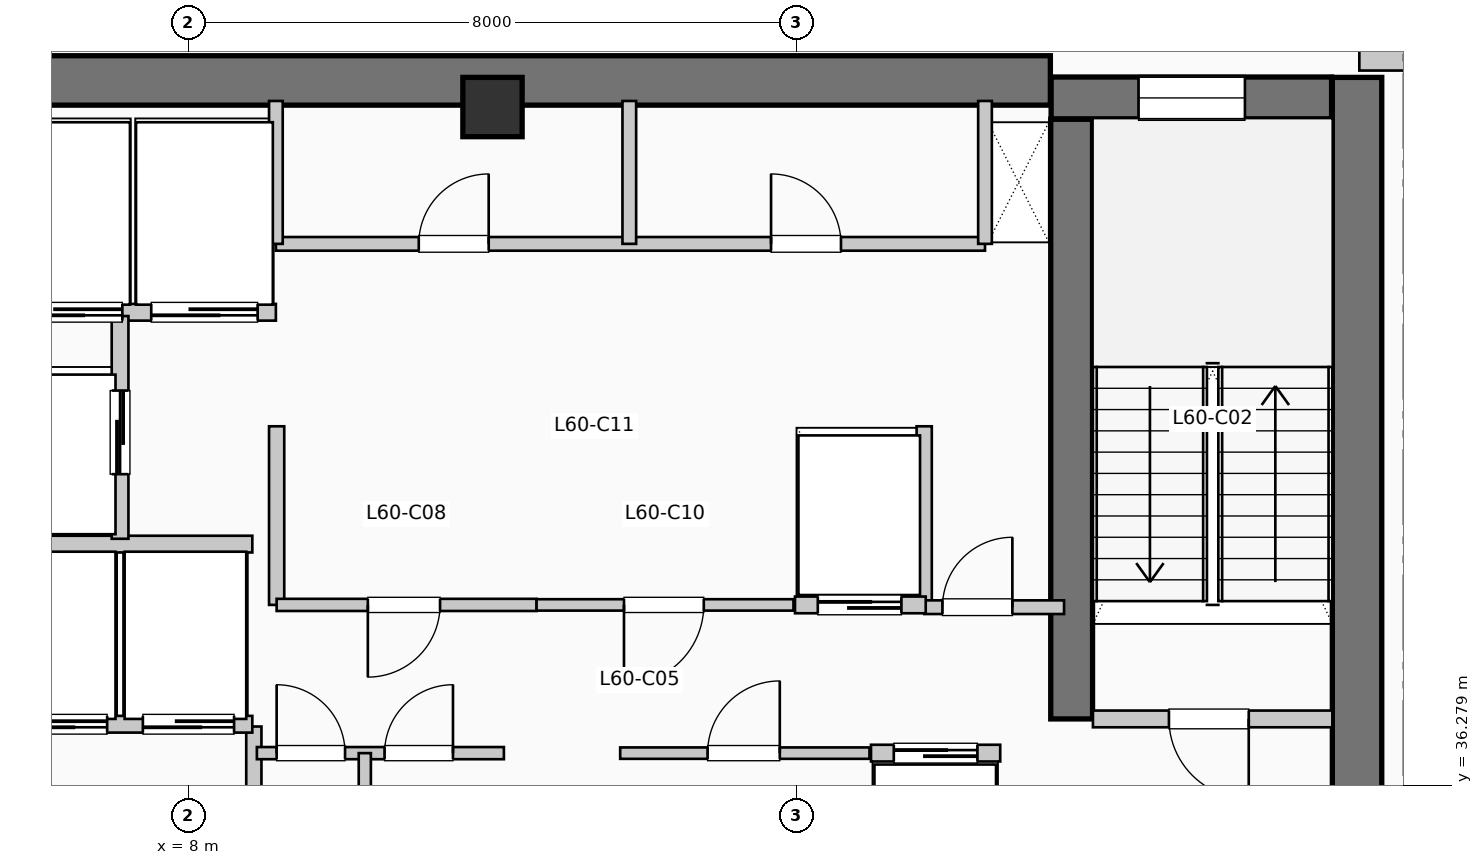
"""IFC4 building model, lengths in metres.
Left out: names, types, materials, properties, quantities, classifications, styles, units other than length and angle.
Written with IfcOpenShell. Run it as: python <this file> out.ifc"""

import sys

from ifc_helpers import new_model, si_unit, direction, frame, frame_2d, origin, origin_2d, place, context, subcontext, project, spatial, rectangle, extrude, element, fill, save


model = new_model("IFC4")
c1 = context("Model", 3, precision=1e-05, world=origin(), true_north=direction((0.0, 1.0)))
c2 = subcontext(c1, "Body", "Model", "MODEL_VIEW")
j1 = project(units=[si_unit("LENGTHUNIT", "METRE"), si_unit("PLANEANGLEUNIT", "RADIAN")], contexts=[c1])
p1 = place(None, origin())
s1 = spatial("IfcSite", under=j1, at=p1, CompositionType="ELEMENT")
p2 = place(p1, origin())
s2 = spatial("IfcBuilding", under=s1, at=p2, CompositionType="ELEMENT")
p3 = place(p2, frame((0.0, 0.0, 247.5)))
s3 = spatial("IfcBuildingStorey", under=s2, at=p3, CompositionType="ELEMENT", Elevation=247.5)
p4 = place(p3, frame((5.36, 45.55, 0.0), z_axis=(0.0, 0.0, 1.0), x_axis=(1.0, 0.0, 0.0)))
e1 = element("IfcWall", 1, at=p4, inside=s3, PredefinedType="SHEAR", context=c2, shape_type="SweptSolid", body=[
    extrude(rectangle(XDim=13.98, YDim=0.65, at=frame_2d((6.99, 0.0))), origin(), (0.0, 0.0, 1.0), 3.96),
])
p5 = place(p3, frame((23.375, 34.95, 0.0), z_axis=(0.0, 0.0, 1.0), x_axis=(0.0, 1.0, 0.0)))
e2 = element("IfcWall", 2, at=p5, inside=s3, PredefinedType="SHEAR", context=c2, shape_type="SweptSolid", body=[
    extrude(rectangle(XDim=10.64, YDim=0.65, at=frame_2d((5.32, 0.0))), origin(), (0.0, 0.0, 1.0), 3.96),
])
p6 = place(p3, frame((19.62, 37.15, 0.0), z_axis=(0.0, 0.0, 1.0), x_axis=(0.0, 1.0, 0.0)))
e3 = element("IfcWall", 3, at=p6, inside=s3, PredefinedType="SHEAR", context=c2, shape_type="SweptSolid", body=[
    extrude(rectangle(XDim=7.89, YDim=0.55, at=frame_2d((3.945, 0.0))), origin(), (0.0, 0.0, 1.0), 3.96),
])
p7 = place(p3, frame((19.35, 45.32, 0.0), z_axis=(0.0, 0.0, 1.0), x_axis=(1.0, 0.0, 0.0)))
e4 = element("IfcWall", 4, at=p7, inside=s3, PredefinedType="SHEAR", context=c2, shape_type="SweptSolid", body=[
    extrude(rectangle(XDim=3.69, YDim=0.55, at=frame_2d((1.845, 0.0))), origin(), (0.0, 0.0, 1.0), 3.96),
])
p8 = place(p7, frame((1.15, 0.0, 1.05)))
e5 = element("IfcOpeningElement", 5, at=p8, cuts=e4, PredefinedType="OPENING", context=c2, shape_type="SweptSolid", body=[
    extrude(rectangle(XDim=1.4, YDim=1.8, at=frame_2d((0.7, 0.9))), frame((0.0, 0.285, 0.0), z_axis=(0.0, -1.0, 0.0), x_axis=(1.0, 0.0, 0.0)), (0.0, 0.0, 1.0), 0.57),
])
p9 = place(p3, frame((12.0, 45.2, 0.0), z_axis=(0.0, 0.0, 1.0), x_axis=(1.0, 0.0, 0.0)))
e6 = element("IfcColumn", 6, at=p9, inside=s3, PredefinedType="COLUMN", context=c2, shape_type="SweptSolid", body=[
    extrude(rectangle(XDim=0.78, YDim=0.78, at=origin_2d()), origin(), (0.0, 0.0, 1.0), 3.96),
])
p10 = place(p3, frame((47.145, 45.84, 0.0), z_axis=(0.0, 0.0, 1.0), x_axis=(-1.0, 0.0, 0.0)))
e7 = element("IfcWall", 7, at=p10, inside=s3, PredefinedType="SOLIDWALL", context=c2, shape_type="SweptSolid", body=[
    extrude(rectangle(XDim=23.74, YDim=0.32, at=frame_2d((11.87, 0.0))), origin(), (0.0, 0.0, 1.0), 3.54),
])
p11 = place(p3, frame((8.86, 34.55, 0.0), z_axis=(0.0, 0.0, 1.0), x_axis=(0.0, 1.0, 0.0)))
e8 = element("IfcWall", 8, at=p11, inside=s3, PredefinedType="PARTITIONING", context=c2, shape_type="SweptSolid", body=[
    extrude(rectangle(XDim=2.5, YDim=0.2, at=frame_2d((1.25, 0.0))), origin(), (0.0, 0.0, 1.0), 3.54),
])
p12 = place(p3, frame((19.9, 37.15, 0.0), z_axis=(0.0, 0.0, 1.0), x_axis=(1.0, 0.0, 0.0)))
e9 = element("IfcWall", 9, at=p12, inside=s3, PredefinedType="PARTITIONING", context=c2, shape_type="SweptSolid", body=[
    extrude(rectangle(XDim=3.15, YDim=0.22, at=frame_2d((1.575, 0.0))), origin(), (0.0, 0.0, 1.0), 3.54),
])
p13 = place(p12, frame((2.05, 0.0, 0.0), z_axis=(0.0, 0.0, 1.0), x_axis=(-1.0, 0.0, 0.0)))
e10 = element("IfcOpeningElement", 10, at=p13, cuts=e9, PredefinedType="OPENING", context=c2, shape_type="SweptSolid", body=[
    extrude(rectangle(XDim=1.05, YDim=2.15, at=frame_2d((0.525, 1.075))), frame((0.0, 0.12, 0.0), z_axis=(0.0, -1.0, 0.0), x_axis=(1.0, 0.0, 0.0)), (0.0, 0.0, 1.0), 0.24),
])
p14 = place(p3, frame((5.38, 37.08, 0.0), z_axis=(0.0, 0.0, 1.0), x_axis=(1.0, 0.0, 0.0)))
e11 = element("IfcWall", 11, at=p14, inside=s3, PredefinedType="PARTITIONING", context=c2, shape_type="SweptSolid", body=[
    extrude(rectangle(XDim=3.46, YDim=0.22, at=frame_2d((1.73, 0.0))), origin(), (0.0, 0.0, 1.0), 3.54),
])
p15 = place(p14, frame((1.55, 0.0, 0.0), z_axis=(0.0, 0.0, 1.0), x_axis=(-1.0, 0.0, 0.0)))
e12 = element("IfcOpeningElement", 12, at=p15, cuts=e11, PredefinedType="OPENING", context=c2, shape_type="SweptSolid", body=[
    extrude(rectangle(XDim=1.2, YDim=2.2, at=frame_2d((0.6, 1.1))), frame((0.0, 0.12, 0.0), z_axis=(0.0, -1.0, 0.0), x_axis=(1.0, 0.0, 0.0)), (0.0, 0.0, 1.0), 0.24),
])
p16 = place(p14, frame((3.22, 0.0, 0.0), z_axis=(0.0, 0.0, 1.0), x_axis=(-1.0, 0.0, 0.0)))
e13 = element("IfcOpeningElement", 13, at=p16, cuts=e11, PredefinedType="OPENING", context=c2, shape_type="SweptSolid", body=[
    extrude(rectangle(XDim=1.2, YDim=2.2, at=frame_2d((0.6, 1.1))), frame((0.0, 0.12, 0.0), z_axis=(0.0, -1.0, 0.0), x_axis=(1.0, 0.0, 0.0)), (0.0, 0.0, 1.0), 0.24),
])
p17 = place(p3, frame((5.38, 39.45, 0.0), z_axis=(0.0, 0.0, 1.0), x_axis=(1.0, 0.0, 0.0)))
e14 = element("IfcWall", 14, at=p17, inside=s3, PredefinedType="PARTITIONING", context=c2, shape_type="SweptSolid", body=[
    extrude(rectangle(XDim=3.46, YDim=0.22, at=frame_2d((1.73, 0.0))), origin(), (0.0, 0.0, 1.0), 3.54),
])
p18 = place(p3, frame((5.38, 42.5, 0.0), z_axis=(0.0, 0.0, 1.0), x_axis=(1.0, 0.0, 0.0)))
e15 = element("IfcWall", 15, at=p18, inside=s3, PredefinedType="PARTITIONING", context=c2, shape_type="SweptSolid", body=[
    extrude(rectangle(XDim=3.77, YDim=0.22, at=frame_2d((1.885, 0.0))), origin(), (0.0, 0.0, 1.0), 3.54),
])
p19 = place(p18, frame((1.75, 0.0, 0.0), z_axis=(0.0, 0.0, 1.0), x_axis=(-1.0, 0.0, 0.0)))
e16 = element("IfcOpeningElement", 16, at=p19, cuts=e15, PredefinedType="OPENING", context=c2, shape_type="SweptSolid", body=[
    extrude(rectangle(XDim=1.4, YDim=2.2, at=frame_2d((0.7, 1.1))), frame((0.0, 0.12, 0.0), z_axis=(0.0, -1.0, 0.0), x_axis=(1.0, 0.0, 0.0)), (0.0, 0.0, 1.0), 0.24),
])
p20 = place(p18, frame((3.53, 0.0, 0.0), z_axis=(0.0, 0.0, 1.0), x_axis=(-1.0, 0.0, 0.0)))
e17 = element("IfcOpeningElement", 17, at=p20, cuts=e15, PredefinedType="OPENING", context=c2, shape_type="SweptSolid", body=[
    extrude(rectangle(XDim=1.4, YDim=2.2, at=frame_2d((0.7, 1.1))), frame((0.0, 0.12, 0.0), z_axis=(0.0, -1.0, 0.0), x_axis=(1.0, 0.0, 0.0)), (0.0, 0.0, 1.0), 0.24),
])
p21 = place(p3, frame((7.1, 39.52, 0.0), z_axis=(0.0, 0.0, 1.0), x_axis=(0.0, 1.0, 0.0)))
e18 = element("IfcWall", 18, at=p21, inside=s3, PredefinedType="PARTITIONING", context=c2, shape_type="SweptSolid", body=[
    extrude(rectangle(XDim=2.93, YDim=0.22, at=frame_2d((1.465, 0.0))), origin(), (0.0, 0.0, 1.0), 3.54),
])
p22 = place(p21, frame((0.85, 0.0, 0.0)))
e19 = element("IfcOpeningElement", 19, at=p22, cuts=e18, PredefinedType="OPENING", context=c2, shape_type="SweptSolid", body=[
    extrude(rectangle(XDim=1.1, YDim=2.2, at=frame_2d((0.55, 1.1))), frame((0.0, 0.12, 0.0), z_axis=(0.0, -1.0, 0.0), x_axis=(1.0, 0.0, 0.0)), (0.0, 0.0, 1.0), 0.24),
])
for number, where, z_axis, x_axis in (
    (20, (9.16, 38.65, 0.0), (0.0, 0.0, 1.0), (0.0, 1.0, 0.0)),
    (21, (17.68, 38.65, 0.0), (0.0, 0.0, 1.0), (0.0, 1.0, 0.0)),
):
    element("IfcWall", number, at=place(p3, frame(where, z_axis=z_axis, x_axis=x_axis)), inside=s3, PredefinedType="PARTITIONING", context=c2, shape_type="SweptSolid", body=[
        extrude(rectangle(XDim=2.35, YDim=0.2, at=frame_2d((1.175, 0.0))), origin(), (0.0, 0.0, 1.0), 3.54),
    ])
p23 = place(p3, frame((17.68, 38.62, 0.0), z_axis=(0.0, 0.0, 1.0), x_axis=(1.0, 0.0, 0.0)))
e22 = element("IfcWall", 22, at=p23, inside=s3, PredefinedType="PARTITIONING", context=c2, shape_type="SweptSolid", body=[
    extrude(rectangle(XDim=1.84, YDim=0.18, at=frame_2d((0.92, 0.0))), origin(), (0.0, 0.0, 1.0), 3.54),
])
p24 = place(p23, frame((0.24, 0.0, 0.0)))
e23 = element("IfcOpeningElement", 23, at=p24, cuts=e22, PredefinedType="OPENING", context=c2, shape_type="SweptSolid", body=[
    extrude(rectangle(XDim=0.92, YDim=2.1, at=frame_2d((0.46, 1.05))), frame((0.0, 0.1, 0.0), z_axis=(0.0, -1.0, 0.0), x_axis=(1.0, 0.0, 0.0)), (0.0, 0.0, 1.0), 0.2),
])
p25 = place(p3, frame((8.9, 36.7, 0.0), z_axis=(0.0, 0.0, 1.0), x_axis=(1.0, 0.0, 0.0)))
e24 = element("IfcWall", 24, at=p25, inside=s3, PredefinedType="PARTITIONING", context=c2, shape_type="SweptSolid", body=[
    extrude(rectangle(XDim=3.25, YDim=0.16, at=frame_2d((1.625, 0.0))), origin(), (0.0, 0.0, 1.0), 3.54),
])
p26 = place(p25, frame((0.26, 0.0, 0.0)))
e25 = element("IfcOpeningElement", 25, at=p26, cuts=e24, PredefinedType="OPENING", context=c2, shape_type="SweptSolid", body=[
    extrude(rectangle(XDim=0.9, YDim=2.15, at=frame_2d((0.45, 1.075))), frame((0.0, 0.09, 0.0), z_axis=(0.0, -1.0, 0.0), x_axis=(1.0, 0.0, 0.0)), (0.0, 0.0, 1.0), 0.18),
])
p27 = place(p25, frame((1.68, 0.0, 0.0)))
e26 = element("IfcOpeningElement", 26, at=p27, cuts=e24, PredefinedType="OPENING", context=c2, shape_type="SweptSolid", body=[
    extrude(rectangle(XDim=0.9, YDim=2.15, at=frame_2d((0.45, 1.075))), frame((0.0, 0.09, 0.0), z_axis=(0.0, -1.0, 0.0), x_axis=(1.0, 0.0, 0.0)), (0.0, 0.0, 1.0), 0.18),
])
p28 = place(p3, frame((10.32, 34.55, 0.0), z_axis=(0.0, 0.0, 1.0), x_axis=(0.0, 1.0, 0.0)))
e27 = element("IfcWall", 27, at=p28, inside=s3, PredefinedType="PARTITIONING", context=c2, shape_type="SweptSolid", body=[
    extrude(rectangle(XDim=2.15, YDim=0.16, at=frame_2d((1.075, 0.0))), origin(), (0.0, 0.0, 1.0), 3.54),
])
p29 = place(p3, frame((9.16, 38.65, 0.0), z_axis=(0.0, 0.0, 1.0), x_axis=(1.0, 0.0, 0.0)))
e28 = element("IfcWall", 28, at=p29, inside=s3, PredefinedType="PARTITIONING", context=c2, shape_type="SweptSolid", body=[
    extrude(rectangle(XDim=3.42, YDim=0.16, at=frame_2d((1.71, 0.0))), origin(), (0.0, 0.0, 1.0), 3.54),
])
p30 = place(p29, frame((2.15, 0.0, 0.0), z_axis=(0.0, 0.0, 1.0), x_axis=(-1.0, 0.0, 0.0)))
e29 = element("IfcOpeningElement", 29, at=p30, cuts=e28, PredefinedType="OPENING", context=c2, shape_type="SweptSolid", body=[
    extrude(rectangle(XDim=0.95, YDim=2.15, at=frame_2d((0.475, 1.075))), frame((0.0, 0.09, 0.0), z_axis=(0.0, -1.0, 0.0), x_axis=(1.0, 0.0, 0.0)), (0.0, 0.0, 1.0), 0.18),
])
p31 = place(p3, frame((13.68, 36.7, 0.0), z_axis=(0.0, 0.0, 1.0), x_axis=(1.0, 0.0, 0.0)))
e30 = element("IfcWall", 30, at=p31, inside=s3, PredefinedType="PARTITIONING", context=c2, shape_type="SweptSolid", body=[
    extrude(rectangle(XDim=3.28, YDim=0.15, at=frame_2d((1.64, 0.0))), origin(), (0.0, 0.0, 1.0), 3.54),
])
p32 = place(p31, frame((1.15, 0.0, 0.0)))
e31 = element("IfcOpeningElement", 31, at=p32, cuts=e30, PredefinedType="OPENING", context=c2, shape_type="SweptSolid", body=[
    extrude(rectangle(XDim=0.95, YDim=2.15, at=frame_2d((0.475, 1.075))), frame((0.0, 0.085, 0.0), z_axis=(0.0, -1.0, 0.0), x_axis=(1.0, 0.0, 0.0)), (0.0, 0.0, 1.0), 0.17),
])
p33 = place(p3, frame((12.58, 38.65, 0.0), z_axis=(0.0, 0.0, 1.0), x_axis=(1.0, 0.0, 0.0)))
e32 = element("IfcWall", 32, at=p33, inside=s3, PredefinedType="PARTITIONING", context=c2, shape_type="SweptSolid", body=[
    extrude(rectangle(XDim=3.38, YDim=0.15, at=frame_2d((1.69, 0.0))), origin(), (0.0, 0.0, 1.0), 3.54),
])
p34 = place(p33, frame((2.2, 0.0, 0.0), z_axis=(0.0, 0.0, 1.0), x_axis=(-1.0, 0.0, 0.0)))
e33 = element("IfcOpeningElement", 33, at=p34, cuts=e32, PredefinedType="OPENING", context=c2, shape_type="SweptSolid", body=[
    extrude(rectangle(XDim=1.05, YDim=2.15, at=frame_2d((0.525, 1.075))), frame((0.0, 0.085, 0.0), z_axis=(0.0, -1.0, 0.0), x_axis=(1.0, 0.0, 0.0)), (0.0, 0.0, 1.0), 0.17),
])
p35 = place(p3, frame((16.98, 36.7, 0.0), z_axis=(0.0, 0.0, 1.0), x_axis=(1.0, 0.0, 0.0)))
e34 = element("IfcWall", 34, at=p35, inside=s3, PredefinedType="PARTITIONING", context=c2, shape_type="SweptSolid", body=[
    extrude(rectangle(XDim=1.7, YDim=0.22, at=frame_2d((0.85, 0.0))), origin(), (0.0, 0.0, 1.0), 3.54),
])
p36 = place(p35, frame((0.3, 0.0, 0.0)))
e35 = element("IfcOpeningElement", 35, at=p36, cuts=e34, PredefinedType="OPENING", context=c2, shape_type="SweptSolid", body=[
    extrude(rectangle(XDim=1.1, YDim=2.2, at=frame_2d((0.55, 1.1))), frame((0.0, 0.12, 0.0), z_axis=(0.0, -1.0, 0.0), x_axis=(1.0, 0.0, 0.0)), (0.0, 0.0, 1.0), 0.24),
])
p37 = place(p3, frame((15.98, 38.65, 0.0), z_axis=(0.0, 0.0, 1.0), x_axis=(1.0, 0.0, 0.0)))
e36 = element("IfcWall", 36, at=p37, inside=s3, PredefinedType="PARTITIONING", context=c2, shape_type="SweptSolid", body=[
    extrude(rectangle(XDim=1.72, YDim=0.22, at=frame_2d((0.86, 0.0))), origin(), (0.0, 0.0, 1.0), 3.54),
])
p38 = place(p37, frame((0.3, 0.0, 0.0)))
e37 = element("IfcOpeningElement", 37, at=p38, cuts=e36, PredefinedType="OPENING", context=c2, shape_type="SweptSolid", body=[
    extrude(rectangle(XDim=1.1, YDim=2.2, at=frame_2d((0.55, 1.1))), frame((0.0, 0.12, 0.0), z_axis=(0.0, -1.0, 0.0), x_axis=(1.0, 0.0, 0.0)), (0.0, 0.0, 1.0), 0.24),
])
p39 = place(p3, frame((9.15, 43.4, 0.0), z_axis=(0.0, 0.0, 1.0), x_axis=(1.0, 0.0, 0.0)))
e38 = element("IfcWall", 38, at=p39, inside=s3, PredefinedType="PLUMBINGWALL", context=c2, shape_type="SweptSolid", body=[
    extrude(rectangle(XDim=9.33, YDim=0.18, at=frame_2d((4.665, 0.0))), origin(), (0.0, 0.0, 1.0), 3.54),
])
p40 = place(p39, frame((1.88, 0.0, 0.0)))
e39 = element("IfcOpeningElement", 39, at=p40, cuts=e38, PredefinedType="OPENING", context=c2, shape_type="SweptSolid", body=[
    extrude(rectangle(XDim=0.92, YDim=2.1, at=frame_2d((0.46, 1.05))), frame((0.0, 0.1, 0.0), z_axis=(0.0, -1.0, 0.0), x_axis=(1.0, 0.0, 0.0)), (0.0, 0.0, 1.0), 0.2),
])
p41 = place(p39, frame((6.515, 0.0, 0.0)))
e40 = element("IfcOpeningElement", 40, at=p41, cuts=e38, PredefinedType="OPENING", context=c2, shape_type="SweptSolid", body=[
    extrude(rectangle(XDim=0.92, YDim=2.1, at=frame_2d((0.46, 1.05))), frame((0.0, 0.1, 0.0), z_axis=(0.0, -1.0, 0.0), x_axis=(1.0, 0.0, 0.0)), (0.0, 0.0, 1.0), 0.2),
])
for number, where, z_axis, x_axis in (
    (41, (9.15, 43.4, 0.0), (0.0, 0.0, 1.0), (0.0, 1.0, 0.0)),
    (42, (18.48, 43.4, 0.0), (0.0, 0.0, 1.0), (0.0, 1.0, 0.0)),
    (43, (13.8, 43.4, 0.0), (0.0, 0.0, 1.0), (0.0, 1.0, 0.0)),
):
    element("IfcWall", number, at=place(p3, frame(where, z_axis=z_axis, x_axis=x_axis)), inside=s3, PredefinedType="PLUMBINGWALL", context=c2, shape_type="SweptSolid", body=[
        extrude(rectangle(XDim=1.88, YDim=0.18, at=frame_2d((0.94, 0.0))), origin(), (0.0, 0.0, 1.0), 3.54),
    ])
p42 = place(p8, origin())
e44 = element("IfcWindow", 44, at=p42, inside=s3, PartitioningType="SINGLE_PANEL", PredefinedType="WINDOW", context=c2, shape_type="SweptSolid", body=[
    extrude(rectangle(XDim=1.4, YDim=1.8, at=frame_2d((0.7, 0.9))), frame((0.0, 0.03, 0.0), z_axis=(0.0, -1.0, 0.0), x_axis=(1.0, 0.0, 0.0)), (0.0, 0.0, 1.0), 0.06),
])
fill(e5, e44)
p43 = place(p13, origin())
e45 = element("IfcDoor", 45, at=p43, inside=s3, OperationType="SINGLE_SWING_RIGHT", PredefinedType="DOOR", context=c2, shape_type="SweptSolid", body=[
    extrude(rectangle(XDim=1.05, YDim=2.15, at=frame_2d((0.525, 1.075))), frame((0.0, 0.025, 0.0), z_axis=(0.0, -1.0, 0.0), x_axis=(1.0, 0.0, 0.0)), (0.0, 0.0, 1.0), 0.05),
])
fill(e10, e45)
p44 = place(p15, origin())
e46 = element("IfcDoor", 46, at=p44, inside=s3, OperationType="SLIDING_TO_RIGHT", PredefinedType="DOOR", context=c2, shape_type="SweptSolid", body=[
    extrude(rectangle(XDim=1.2, YDim=2.2, at=frame_2d((0.6, 1.1))), frame((0.0, 0.025, 0.0), z_axis=(0.0, -1.0, 0.0), x_axis=(1.0, 0.0, 0.0)), (0.0, 0.0, 1.0), 0.05),
])
fill(e12, e46)
p45 = place(p16, origin())
e47 = element("IfcDoor", 47, at=p45, inside=s3, OperationType="SLIDING_TO_RIGHT", PredefinedType="DOOR", context=c2, shape_type="SweptSolid", body=[
    extrude(rectangle(XDim=1.2, YDim=2.2, at=frame_2d((0.6, 1.1))), frame((0.0, 0.025, 0.0), z_axis=(0.0, -1.0, 0.0), x_axis=(1.0, 0.0, 0.0)), (0.0, 0.0, 1.0), 0.05),
])
fill(e13, e47)
p46 = place(p19, origin())
e48 = element("IfcDoor", 48, at=p46, inside=s3, OperationType="SLIDING_TO_LEFT", PredefinedType="DOOR", context=c2, shape_type="SweptSolid", body=[
    extrude(rectangle(XDim=1.4, YDim=2.2, at=frame_2d((0.7, 1.1))), frame((0.0, 0.025, 0.0), z_axis=(0.0, -1.0, 0.0), x_axis=(1.0, 0.0, 0.0)), (0.0, 0.0, 1.0), 0.05),
])
fill(e16, e48)
p47 = place(p20, origin())
e49 = element("IfcDoor", 49, at=p47, inside=s3, OperationType="SLIDING_TO_LEFT", PredefinedType="DOOR", context=c2, shape_type="SweptSolid", body=[
    extrude(rectangle(XDim=1.4, YDim=2.2, at=frame_2d((0.7, 1.1))), frame((0.0, 0.025, 0.0), z_axis=(0.0, -1.0, 0.0), x_axis=(1.0, 0.0, 0.0)), (0.0, 0.0, 1.0), 0.05),
])
fill(e17, e49)
p48 = place(p22, origin())
e50 = element("IfcDoor", 50, at=p48, inside=s3, OperationType="SLIDING_TO_LEFT", PredefinedType="DOOR", context=c2, shape_type="SweptSolid", body=[
    extrude(rectangle(XDim=1.1, YDim=2.2, at=frame_2d((0.55, 1.1))), frame((0.0, 0.025, 0.0), z_axis=(0.0, -1.0, 0.0), x_axis=(1.0, 0.0, 0.0)), (0.0, 0.0, 1.0), 0.05),
])
fill(e19, e50)
p49 = place(p24, origin())
e51 = element("IfcDoor", 51, at=p49, inside=s3, OperationType="SINGLE_SWING_RIGHT", PredefinedType="DOOR", context=c2, shape_type="SweptSolid", body=[
    extrude(rectangle(XDim=0.92, YDim=2.1, at=frame_2d((0.46, 1.05))), frame((0.0, 0.025, 0.0), z_axis=(0.0, -1.0, 0.0), x_axis=(1.0, 0.0, 0.0)), (0.0, 0.0, 1.0), 0.05),
])
fill(e23, e51)
p50 = place(p26, origin())
e52 = element("IfcDoor", 52, at=p50, inside=s3, OperationType="SINGLE_SWING_LEFT", PredefinedType="DOOR", context=c2, shape_type="SweptSolid", body=[
    extrude(rectangle(XDim=0.9, YDim=2.15, at=frame_2d((0.45, 1.075))), frame((0.0, 0.025, 0.0), z_axis=(0.0, -1.0, 0.0), x_axis=(1.0, 0.0, 0.0)), (0.0, 0.0, 1.0), 0.05),
])
fill(e25, e52)
p51 = place(p27, origin())
e53 = element("IfcDoor", 53, at=p51, inside=s3, OperationType="SINGLE_SWING_RIGHT", PredefinedType="DOOR", context=c2, shape_type="SweptSolid", body=[
    extrude(rectangle(XDim=0.9, YDim=2.15, at=frame_2d((0.45, 1.075))), frame((0.0, 0.025, 0.0), z_axis=(0.0, -1.0, 0.0), x_axis=(1.0, 0.0, 0.0)), (0.0, 0.0, 1.0), 0.05),
])
fill(e26, e53)
p52 = place(p30, origin())
e54 = element("IfcDoor", 54, at=p52, inside=s3, OperationType="SINGLE_SWING_LEFT", PredefinedType="DOOR", context=c2, shape_type="SweptSolid", body=[
    extrude(rectangle(XDim=0.95, YDim=2.15, at=frame_2d((0.475, 1.075))), frame((0.0, 0.025, 0.0), z_axis=(0.0, -1.0, 0.0), x_axis=(1.0, 0.0, 0.0)), (0.0, 0.0, 1.0), 0.05),
])
fill(e29, e54)
p53 = place(p32, origin())
e55 = element("IfcDoor", 55, at=p53, inside=s3, OperationType="SINGLE_SWING_RIGHT", PredefinedType="DOOR", context=c2, shape_type="SweptSolid", body=[
    extrude(rectangle(XDim=0.95, YDim=2.15, at=frame_2d((0.475, 1.075))), frame((0.0, 0.025, 0.0), z_axis=(0.0, -1.0, 0.0), x_axis=(1.0, 0.0, 0.0)), (0.0, 0.0, 1.0), 0.05),
])
fill(e31, e55)
p54 = place(p34, origin())
e56 = element("IfcDoor", 56, at=p54, inside=s3, OperationType="SINGLE_SWING_LEFT", PredefinedType="DOOR", context=c2, shape_type="SweptSolid", body=[
    extrude(rectangle(XDim=1.05, YDim=2.15, at=frame_2d((0.525, 1.075))), frame((0.0, 0.025, 0.0), z_axis=(0.0, -1.0, 0.0), x_axis=(1.0, 0.0, 0.0)), (0.0, 0.0, 1.0), 0.05),
])
fill(e33, e56)
p55 = place(p36, origin())
e57 = element("IfcDoor", 57, at=p55, inside=s3, OperationType="SLIDING_TO_LEFT", PredefinedType="DOOR", context=c2, shape_type="SweptSolid", body=[
    extrude(rectangle(XDim=1.1, YDim=2.2, at=frame_2d((0.55, 1.1))), frame((0.0, 0.025, 0.0), z_axis=(0.0, -1.0, 0.0), x_axis=(1.0, 0.0, 0.0)), (0.0, 0.0, 1.0), 0.05),
])
fill(e35, e57)
p56 = place(p38, origin())
e58 = element("IfcDoor", 58, at=p56, inside=s3, OperationType="SLIDING_TO_LEFT", PredefinedType="DOOR", context=c2, shape_type="SweptSolid", body=[
    extrude(rectangle(XDim=1.1, YDim=2.2, at=frame_2d((0.55, 1.1))), frame((0.0, 0.025, 0.0), z_axis=(0.0, -1.0, 0.0), x_axis=(1.0, 0.0, 0.0)), (0.0, 0.0, 1.0), 0.05),
])
fill(e37, e58)
p57 = place(p40, origin())
e59 = element("IfcDoor", 59, at=p57, inside=s3, OperationType="SINGLE_SWING_RIGHT", PredefinedType="DOOR", context=c2, shape_type="SweptSolid", body=[
    extrude(rectangle(XDim=0.92, YDim=2.1, at=frame_2d((0.46, 1.05))), frame((0.0, 0.025, 0.0), z_axis=(0.0, -1.0, 0.0), x_axis=(1.0, 0.0, 0.0)), (0.0, 0.0, 1.0), 0.05),
])
fill(e39, e59)
p58 = place(p41, origin())
e60 = element("IfcDoor", 60, at=p58, inside=s3, OperationType="SINGLE_SWING_LEFT", PredefinedType="DOOR", context=c2, shape_type="SweptSolid", body=[
    extrude(rectangle(XDim=0.92, YDim=2.1, at=frame_2d((0.46, 1.05))), frame((0.0, 0.025, 0.0), z_axis=(0.0, -1.0, 0.0), x_axis=(1.0, 0.0, 0.0)), (0.0, 0.0, 1.0), 0.05),
])
fill(e40, e60)
save(model, sys.argv[1])
